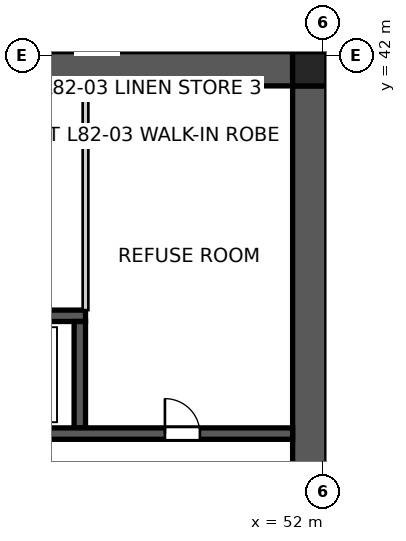
"""IFC4 building model, lengths in metres.
Left out: names, types, materials, properties, quantities, classifications, styles, units other than length and angle.
Written with IfcOpenShell. Run it as: python <this file> out.ifc"""

import sys

from ifc_helpers import new_model, si_unit, direction, frame, frame_2d, origin, origin_2d, place, context, subcontext, project, spatial, polyline, rectangle, outline, extrude, element, fill, save


model = new_model("IFC4")
c1 = context("Model", 3, precision=1e-05, world=origin(), true_north=direction((0.0, 1.0)))
c2 = subcontext(c1, "Body", "Model", "MODEL_VIEW")
j1 = project(units=[si_unit("LENGTHUNIT", "METRE"), si_unit("PLANEANGLEUNIT", "RADIAN")], contexts=[c1])
p1 = place(None, origin())
s1 = spatial("IfcSite", under=j1, at=p1, CompositionType="ELEMENT")
p2 = place(p1, origin())
s2 = spatial("IfcBuilding", under=s1, at=p2, CompositionType="ELEMENT")
p3 = place(p2, frame((0.0, 0.0, 296.4)))
s3 = spatial("IfcBuildingStorey", under=s2, at=p3, CompositionType="ELEMENT", Elevation=296.4)
p4 = place(p3, frame((28.8, 41.65, 0.0), z_axis=(0.0, 0.0, 1.0), x_axis=(1.0, 0.0, 0.0)))
e1 = element("IfcWall", 1, at=p4, inside=s3, PredefinedType="SHEAR", context=c2, shape_type="SweptSolid", body=[
    extrude(outline(polyline([(0.0, -0.45), (22.4, -0.45), (22.4, -0.025), (22.85, -0.025), (22.85, 0.025), (22.4, 0.025), (22.4, 0.45), (0.0, 0.45), (0.0, 0.025), (-0.45, 0.025), (-0.45, -0.025), (0.0, -0.025), (0.0, -0.45)])), origin(), (0.0, 0.0, 1.0), 3.4),
])
p5 = place(p3, frame((51.65, 18.8, 0.0), z_axis=(0.0, 0.0, 1.0), x_axis=(0.0, 1.0, 0.0)))
e2 = element("IfcWall", 2, at=p5, inside=s3, PredefinedType="SHEAR", context=c2, shape_type="SweptSolid", body=[
    extrude(outline(polyline([(0.0, -0.45), (22.4, -0.45), (22.4, -0.025), (22.85, -0.025), (22.85, 0.025), (22.4, 0.025), (22.4, 0.45), (0.0, 0.45), (0.0, 0.025), (-0.45, 0.025), (-0.45, -0.025), (0.0, -0.025), (0.0, -0.45)])), origin(), (0.0, 0.0, 1.0), 3.4),
])
p6 = place(p5, frame((11.14, 0.0, 0.0)))
e3 = element("IfcOpeningElement", 3, at=p6, cuts=e2, PredefinedType="OPENING", context=c2, shape_type="SweptSolid", body=[
    extrude(rectangle(XDim=1.02, YDim=2.4, at=frame_2d((0.51, 1.2))), frame((0.0, 0.46, 0.0), z_axis=(0.0, -1.0, 0.0), x_axis=(1.0, 0.0, 0.0)), (0.0, 0.0, 1.0), 0.92),
])
p7 = place(p3, frame((28.8, 32.05, 0.0), z_axis=(0.0, 0.0, 1.0), x_axis=(1.0, 0.0, 0.0)))
e4 = element("IfcWall", 4, at=p7, inside=s3, PredefinedType="SHEAR", context=c2, shape_type="SweptSolid", body=[
    extrude(rectangle(XDim=22.4, YDim=0.3, at=frame_2d((11.2, 0.0))), origin(), (0.0, 0.0, 1.0), 3.4),
])
p8 = place(p7, frame((19.04, 0.0, 0.0)))
e5 = element("IfcOpeningElement", 5, at=p8, cuts=e4, PredefinedType="OPENING", context=c2, shape_type="SweptSolid", body=[
    extrude(rectangle(XDim=0.92, YDim=2.1, at=frame_2d((0.46, 1.05))), frame((0.0, 0.16, 0.0), z_axis=(0.0, -1.0, 0.0), x_axis=(1.0, 0.0, 0.0)), (0.0, 0.0, 1.0), 0.32),
])
p9 = place(p7, frame((1.265, 0.0, 0.0)))
e6 = element("IfcOpeningElement", 6, at=p9, cuts=e4, PredefinedType="OPENING", context=c2, shape_type="SweptSolid", body=[
    extrude(rectangle(XDim=1.02, YDim=2.1, at=frame_2d((0.51, 1.05))), frame((0.0, 0.16, 0.0), z_axis=(0.0, -1.0, 0.0), x_axis=(1.0, 0.0, 0.0)), (0.0, 0.0, 1.0), 0.32),
])
p10 = place(p7, frame((4.015, 0.0, 0.0)))
e7 = element("IfcOpeningElement", 7, at=p10, cuts=e4, PredefinedType="OPENING", context=c2, shape_type="SweptSolid", body=[
    extrude(rectangle(XDim=0.92, YDim=2.1, at=frame_2d((0.46, 1.05))), frame((0.0, 0.16, 0.0), z_axis=(0.0, -1.0, 0.0), x_axis=(1.0, 0.0, 0.0)), (0.0, 0.0, 1.0), 0.32),
])
p11 = place(p7, frame((6.115, 0.0, 0.0)))
e8 = element("IfcOpeningElement", 8, at=p11, cuts=e4, PredefinedType="OPENING", context=c2, shape_type="SweptSolid", body=[
    extrude(rectangle(XDim=0.92, YDim=2.1, at=frame_2d((0.46, 1.05))), frame((0.0, 0.16, 0.0), z_axis=(0.0, -1.0, 0.0), x_axis=(1.0, 0.0, 0.0)), (0.0, 0.0, 1.0), 0.32),
])
p12 = place(p7, frame((9.79, 0.0, 0.0)))
e9 = element("IfcOpeningElement", 9, at=p12, cuts=e4, PredefinedType="OPENING", context=c2, shape_type="SweptSolid", body=[
    extrude(rectangle(XDim=0.92, YDim=2.1, at=frame_2d((0.46, 1.05))), frame((0.0, 0.16, 0.0), z_axis=(0.0, -1.0, 0.0), x_axis=(1.0, 0.0, 0.0)), (0.0, 0.0, 1.0), 0.32),
])
p13 = place(p7, frame((12.05, 0.0, 0.0)))
e10 = element("IfcOpeningElement", 10, at=p13, cuts=e4, PredefinedType="OPENING", context=c2, shape_type="SweptSolid", body=[
    extrude(rectangle(XDim=1.1, YDim=2.1, at=frame_2d((0.55, 1.05))), frame((0.0, 0.16, 0.0), z_axis=(0.0, -1.0, 0.0), x_axis=(1.0, 0.0, 0.0)), (0.0, 0.0, 1.0), 0.32),
])
p14 = place(p7, frame((14.85, 0.0, 0.0)))
e11 = element("IfcOpeningElement", 11, at=p14, cuts=e4, PredefinedType="OPENING", context=c2, shape_type="SweptSolid", body=[
    extrude(rectangle(XDim=1.1, YDim=2.1, at=frame_2d((0.55, 1.05))), frame((0.0, 0.16, 0.0), z_axis=(0.0, -1.0, 0.0), x_axis=(1.0, 0.0, 0.0)), (0.0, 0.0, 1.0), 0.32),
])
p15 = place(p3, frame((34.25, 35.15, 0.0), z_axis=(0.0, 0.0, 1.0), x_axis=(1.0, 0.0, 0.0)))
e12 = element("IfcWall", 12, at=p15, inside=s3, PredefinedType="SHEAR", context=c2, shape_type="SweptSolid", body=[
    extrude(rectangle(XDim=11.5, YDim=0.3, at=frame_2d((5.75, 0.0))), origin(), (0.0, 0.0, 1.0), 3.4),
])
p16 = place(p3, frame((45.6, 32.2, 0.0), z_axis=(0.0, 0.0, 1.0), x_axis=(0.0, 1.0, 0.0)))
e13 = element("IfcWall", 13, at=p16, inside=s3, PredefinedType="SHEAR", context=c2, shape_type="SweptSolid", body=[
    extrude(rectangle(XDim=2.8, YDim=0.3, at=frame_2d((1.4, 0.0))), origin(), (0.0, 0.0, 1.0), 3.4),
])
p17 = place(p3, frame((51.65, 41.65, 0.0), z_axis=(0.0, 0.0, 1.0), x_axis=(1.0, 0.0, 0.0)))
e14 = element("IfcColumn", 14, at=p17, inside=s3, PredefinedType="COLUMN", context=c2, shape_type="SweptSolid", body=[
    extrude(rectangle(XDim=0.9, YDim=0.9, at=origin_2d()), origin(), (0.0, 0.0, 1.0), 3.4),
])
p18 = place(p3, frame((55.704, 43.177, 0.0), z_axis=(0.0, 0.0, 1.0), x_axis=(-0.76603440109, -0.64279957712, 0.0)))
e15 = element("IfcWall", 15, at=p18, inside=s3, PredefinedType="PARTITIONING", context=c2, shape_type="SweptSolid", body=[
    extrude(rectangle(XDim=4.64, YDim=0.25, at=frame_2d((2.32, 0.0))), origin(), (0.0, 0.0, 1.0), 3.2),
])
p19 = place(p3, frame((45.75, 41.2, 0.0), z_axis=(0.0, 0.0, 1.0), x_axis=(0.0, -1.0, 0.0)))
e16 = element("IfcWall", 16, at=p19, inside=s3, PredefinedType="SOLIDWALL", context=c2, shape_type="SweptSolid", body=[
    extrude(rectangle(XDim=5.9, YDim=0.15, at=frame_2d((2.95, 0.0))), origin(), (0.0, 0.0, 1.0), 3.2),
])
p20 = place(p8, origin())
e17 = element("IfcDoor", 17, at=p20, inside=s3, OperationType="SINGLE_SWING_LEFT", PredefinedType="DOOR", context=c2, shape_type="SweptSolid", body=[
    extrude(rectangle(XDim=0.92, YDim=2.1, at=frame_2d((0.46, 1.05))), frame((0.0, 0.025, 0.0), z_axis=(0.0, -1.0, 0.0), x_axis=(1.0, 0.0, 0.0)), (0.0, 0.0, 1.0), 0.05),
])
fill(e5, e17)
save(model, sys.argv[1])
